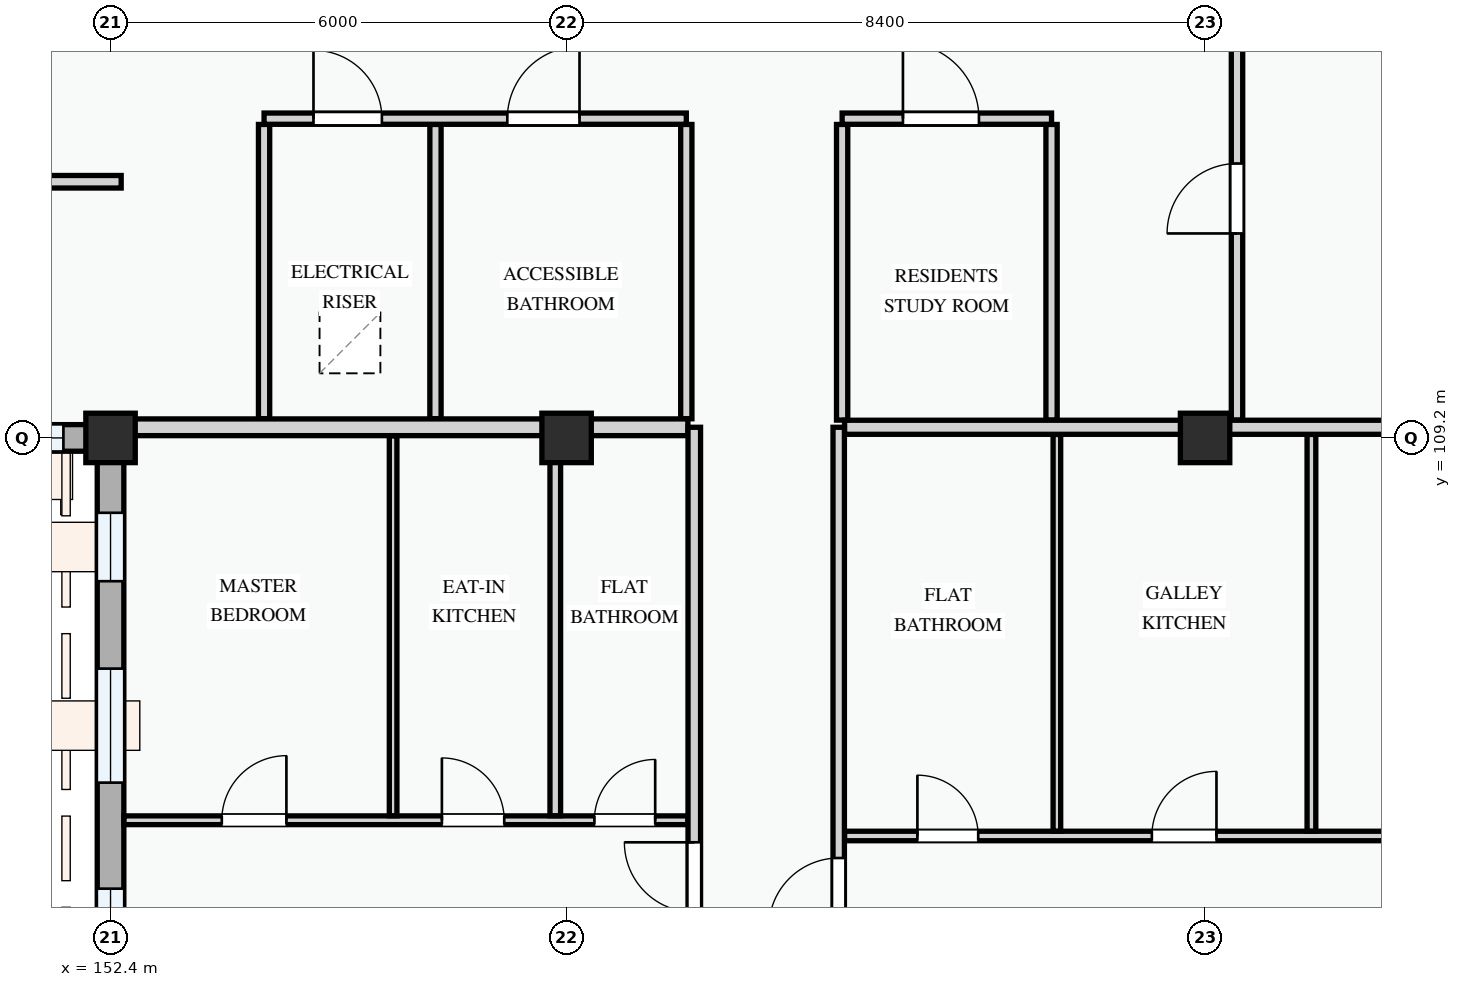
"""IFC4 building model, lengths in metres.
Left out: names, types, materials, properties, quantities, classifications, styles, units other than length and angle.
Written with IfcOpenShell. Run it as: python <this file> out.ifc"""

import sys

from ifc_helpers import new_model, si_unit, direction, frame, frame_2d, origin, origin_2d, place, context, subcontext, project, spatial, rectangle, extrude, element, fill, save


model = new_model("IFC4")
c1 = context("Model", 3, precision=1e-05, world=origin(), true_north=direction((0.0, 1.0)))
c2 = subcontext(c1, "Body", "Model", "MODEL_VIEW")
j1 = project(units=[si_unit("LENGTHUNIT", "METRE"), si_unit("PLANEANGLEUNIT", "RADIAN")], contexts=[c1])
p1 = place(None, origin())
s1 = spatial("IfcSite", under=j1, at=p1, CompositionType="ELEMENT")
p2 = place(p1, origin())
s2 = spatial("IfcBuilding", under=s1, at=p2, CompositionType="ELEMENT")
p3 = place(p2, frame((0.0, 0.0, 11.4)))
s3 = spatial("IfcBuildingStorey", under=s2, at=p3, CompositionType="ELEMENT", Elevation=11.4)
for number, where, z_axis, x_axis in (
    (1, (152.4, 109.2, 0.0), (0.0, 0.0, 1.0), (1.0, 0.0, 0.0)),
    (2, (158.4, 109.2, 0.0), (0.0, 0.0, 1.0), (1.0, 0.0, 0.0)),
    (3, (166.8, 109.2, 0.0), (0.0, 0.0, 1.0), (1.0, 0.0, 0.0)),
):
    element("IfcColumn", number, at=place(p3, frame(where, z_axis=z_axis, x_axis=x_axis)), inside=s3, PredefinedType="COLUMN", context=c2, shape_type="SweptSolid", body=[
        extrude(rectangle(XDim=0.65, YDim=0.65, at=origin_2d()), origin(), (0.0, 0.0, 1.0), 3.3),
    ])
p4 = place(p3, frame((144.0, 109.2, 0.0), z_axis=(0.0, 0.0, 1.0), x_axis=(1.0, 0.0, 0.0)))
e4 = element("IfcWall", 4, at=p4, inside=s3, PredefinedType="STANDARD", context=c2, shape_type="SweptSolid", body=[
    extrude(rectangle(XDim=8.4, YDim=0.35, at=frame_2d((4.2, 0.0))), origin(), (0.0, 0.0, 1.0), 2.375),
])
p5 = place(p4, frame((0.99, 0.0, 0.78)))
e5 = element("IfcOpeningElement", 5, at=p5, cuts=e4, PredefinedType="OPENING", context=c2, shape_type="SweptSolid", body=[
    extrude(rectangle(XDim=1.4, YDim=1.45, at=frame_2d((0.7, 0.725))), frame((0.0, 0.185, 0.0), z_axis=(0.0, -1.0, 0.0), x_axis=(1.0, 0.0, 0.0)), (0.0, 0.0, 1.0), 0.37),
])
p6 = place(p4, frame((3.925, 0.0, 0.78)))
e6 = element("IfcOpeningElement", 6, at=p6, cuts=e4, PredefinedType="OPENING", context=c2, shape_type="SweptSolid", body=[
    extrude(rectangle(XDim=1.25, YDim=1.45, at=frame_2d((0.625, 0.725))), frame((0.0, 0.185, 0.0), z_axis=(0.0, -1.0, 0.0), x_axis=(1.0, 0.0, 0.0)), (0.0, 0.0, 1.0), 0.37),
])
p7 = place(p4, frame((6.48, 0.0, 0.78)))
e7 = element("IfcOpeningElement", 7, at=p7, cuts=e4, PredefinedType="OPENING", context=c2, shape_type="SweptSolid", body=[
    extrude(rectangle(XDim=1.3, YDim=1.4, at=frame_2d((0.65, 0.7))), frame((0.0, 0.185, 0.0), z_axis=(0.0, -1.0, 0.0), x_axis=(1.0, 0.0, 0.0)), (0.0, 0.0, 1.0), 0.37),
])
p8 = place(p3, frame((152.4, 109.2, 0.0), z_axis=(0.0, 0.0, 1.0), x_axis=(0.0, -1.0, 0.0)))
e8 = element("IfcWall", 8, at=p8, inside=s3, PredefinedType="STANDARD", context=c2, shape_type="SweptSolid", body=[
    extrude(rectangle(XDim=8.4, YDim=0.35, at=frame_2d((4.2, 0.0))), origin(), (0.0, 0.0, 1.0), 2.425),
])
p9 = place(p8, frame((0.985, 0.0, 0.78)))
e9 = element("IfcOpeningElement", 9, at=p9, cuts=e8, PredefinedType="OPENING", context=c2, shape_type="SweptSolid", body=[
    extrude(rectangle(XDim=0.9, YDim=1.2, at=frame_2d((0.45, 0.6))), frame((0.0, 0.185, 0.0), z_axis=(0.0, -1.0, 0.0), x_axis=(1.0, 0.0, 0.0)), (0.0, 0.0, 1.0), 0.37),
])
p10 = place(p8, frame((3.035, 0.0, 0.78)))
e10 = element("IfcOpeningElement", 10, at=p10, cuts=e8, PredefinedType="OPENING", context=c2, shape_type="SweptSolid", body=[
    extrude(rectangle(XDim=1.5, YDim=1.5, at=frame_2d((0.75, 0.75))), frame((0.0, 0.185, 0.0), z_axis=(0.0, -1.0, 0.0), x_axis=(1.0, 0.0, 0.0)), (0.0, 0.0, 1.0), 0.37),
])
p11 = place(p8, frame((5.93, 0.0, 0.78)))
e11 = element("IfcOpeningElement", 11, at=p11, cuts=e8, PredefinedType="OPENING", context=c2, shape_type="SweptSolid", body=[
    extrude(rectangle(XDim=1.38, YDim=1.48, at=frame_2d((0.69, 0.74))), frame((0.0, 0.185, 0.0), z_axis=(0.0, -1.0, 0.0), x_axis=(1.0, 0.0, 0.0)), (0.0, 0.0, 1.0), 0.37),
])
for number, where, z_axis, x_axis in (
    (12, (154.42, 113.324, 0.0), (0.0, 0.0, 1.0), (0.0, -1.0, 0.0)),
    (13, (156.675, 113.324, 0.0), (0.0, 0.0, 1.0), (0.0, -1.0, 0.0)),
    (14, (159.975, 113.324, 0.0), (0.0, 0.0, 1.0), (0.0, -1.0, 0.0)),
):
    element("IfcWall", number, at=place(p3, frame(where, z_axis=z_axis, x_axis=x_axis)), inside=s3, PredefinedType="PARTITIONING", context=c2, shape_type="SweptSolid", body=[
        extrude(rectangle(XDim=3.872, YDim=0.148, at=frame_2d((1.936, 0.0))), origin(), (0.0, 0.0, 1.0), 3.0),
    ])
for number, where, z_axis, x_axis in (
    (15, (162.025, 113.324, 0.0), (0.0, 0.0, 1.0), (0.0, -1.0, 0.0)),
    (16, (164.78, 113.324, 0.0), (0.0, 0.0, 1.0), (0.0, -1.0, 0.0)),
):
    element("IfcWall", number, at=place(p3, frame(where, z_axis=z_axis, x_axis=x_axis)), inside=s3, PredefinedType="PARTITIONING", context=c2, shape_type="SweptSolid", body=[
        extrude(rectangle(XDim=3.889, YDim=0.148, at=frame_2d((1.945, 0.0))), origin(), (0.0, 0.0, 1.0), 3.0),
    ])
p12 = place(p3, frame((154.42, 113.4, 0.0), z_axis=(0.0, 0.0, 1.0), x_axis=(1.0, 0.0, 0.0)))
e17 = element("IfcWall", 17, at=p12, inside=s3, PredefinedType="PARTITIONING", context=c2, shape_type="SweptSolid", body=[
    extrude(rectangle(XDim=5.555, YDim=0.148, at=frame_2d((2.778, 0.0))), origin(), (0.0, 0.0, 1.0), 3.0),
])
p13 = place(p12, frame((0.65, 0.0, 0.0)))
e18 = element("IfcOpeningElement", 18, at=p13, cuts=e17, PredefinedType="OPENING", context=c2, shape_type="SweptSolid", body=[
    extrude(rectangle(XDim=0.9, YDim=2.1, at=frame_2d((0.45, 1.05))), frame((0.0, 0.084, 0.0), z_axis=(0.0, -1.0, 0.0), x_axis=(1.0, 0.0, 0.0)), (0.0, 0.0, 1.0), 0.168),
])
p14 = place(p12, frame((3.2, 0.0, 0.0)))
e19 = element("IfcOpeningElement", 19, at=p14, cuts=e17, PredefinedType="OPENING", context=c2, shape_type="SweptSolid", body=[
    extrude(rectangle(XDim=0.95, YDim=2.1, at=frame_2d((0.475, 1.05))), frame((0.0, 0.084, 0.0), z_axis=(0.0, -1.0, 0.0), x_axis=(1.0, 0.0, 0.0)), (0.0, 0.0, 1.0), 0.168),
])
p15 = place(p3, frame((162.025, 113.4, 0.0), z_axis=(0.0, 0.0, 1.0), x_axis=(1.0, 0.0, 0.0)))
e20 = element("IfcWall", 20, at=p15, inside=s3, PredefinedType="PARTITIONING", context=c2, shape_type="SweptSolid", body=[
    extrude(rectangle(XDim=2.755, YDim=0.148, at=frame_2d((1.377, 0.0))), origin(), (0.0, 0.0, 1.0), 3.0),
])
p16 = place(p15, frame((0.8, 0.0, 0.0)))
e21 = element("IfcOpeningElement", 21, at=p16, cuts=e20, PredefinedType="OPENING", context=c2, shape_type="SweptSolid", body=[
    extrude(rectangle(XDim=1.0, YDim=2.15, at=frame_2d((0.5, 1.075))), frame((0.0, 0.084, 0.0), z_axis=(0.0, -1.0, 0.0), x_axis=(1.0, 0.0, 0.0)), (0.0, 0.0, 1.0), 0.168),
])
p17 = place(p3, frame((150.127, 112.57, 0.0), z_axis=(0.0, 0.0, 1.0), x_axis=(1.0, 0.0, 0.0)))
e22 = element("IfcWall", 22, at=p17, inside=s3, PredefinedType="PARTITIONING", context=c2, shape_type="SweptSolid", body=[
    extrude(rectangle(XDim=2.413, YDim=0.165, at=frame_2d((1.207, 0.0))), origin(), (0.0, 0.0, 1.0), 3.0),
])
p18 = place(p3, frame((167.22, 109.435, 0.0), z_axis=(0.0, 0.0, 1.0), x_axis=(0.0, 1.0, 0.0)))
e23 = element("IfcWall", 23, at=p18, inside=s3, PredefinedType="PARTITIONING", context=c2, shape_type="SweptSolid", body=[
    extrude(rectangle(XDim=13.989, YDim=0.15, at=frame_2d((6.994, 0.0))), origin(), (0.0, 0.0, 1.0), 2.425),
])
p19 = place(p18, frame((2.456, 0.0, 0.0)))
e24 = element("IfcOpeningElement", 24, at=p19, cuts=e23, PredefinedType="OPENING", context=c2, shape_type="SweptSolid", body=[
    extrude(rectangle(XDim=0.92, YDim=2.1, at=frame_2d((0.46, 1.05))), frame((0.0, 0.085, 0.0), z_axis=(0.0, -1.0, 0.0), x_axis=(1.0, 0.0, 0.0)), (0.0, 0.0, 1.0), 0.17),
])
p20 = place(p3, frame((152.577, 104.17, 0.0), z_axis=(0.0, 0.0, 1.0), x_axis=(1.0, 0.0, 0.0)))
e25 = element("IfcWall", 25, at=p20, inside=s3, PredefinedType="PARTITIONING", context=c2, shape_type="SweptSolid", body=[
    extrude(rectangle(XDim=7.419, YDim=0.115, at=frame_2d((3.709, 0.0))), origin(), (0.0, 0.0, 1.0), 3.0),
])
p21 = place(p20, frame((1.287, 0.0, 0.0)))
e26 = element("IfcOpeningElement", 26, at=p21, cuts=e25, PredefinedType="OPENING", context=c2, shape_type="SweptSolid", body=[
    extrude(rectangle(XDim=0.85, YDim=2.1, at=frame_2d((0.425, 1.05))), frame((0.0, 0.067, 0.0), z_axis=(0.0, -1.0, 0.0), x_axis=(1.0, 0.0, 0.0)), (0.0, 0.0, 1.0), 0.135),
])
p22 = place(p20, frame((4.182, 0.0, 0.0)))
e27 = element("IfcOpeningElement", 27, at=p22, cuts=e25, PredefinedType="OPENING", context=c2, shape_type="SweptSolid", body=[
    extrude(rectangle(XDim=0.82, YDim=2.08, at=frame_2d((0.41, 1.04))), frame((0.0, 0.067, 0.0), z_axis=(0.0, -1.0, 0.0), x_axis=(1.0, 0.0, 0.0)), (0.0, 0.0, 1.0), 0.135),
])
p23 = place(p20, frame((6.189, 0.0, 0.0)))
e28 = element("IfcOpeningElement", 28, at=p23, cuts=e25, PredefinedType="OPENING", context=c2, shape_type="SweptSolid", body=[
    extrude(rectangle(XDim=0.8, YDim=2.1, at=frame_2d((0.4, 1.05))), frame((0.0, 0.067, 0.0), z_axis=(0.0, -1.0, 0.0), x_axis=(1.0, 0.0, 0.0)), (0.0, 0.0, 1.0), 0.135),
])
p24 = place(p3, frame((156.118, 104.229, 0.0), z_axis=(0.0, 0.0, 1.0), x_axis=(0.0, 1.0, 0.0)))
e29 = element("IfcWall", 29, at=p24, inside=s3, PredefinedType="PARTITIONING", context=c2, shape_type="SweptSolid", body=[
    extrude(rectangle(XDim=4.999, YDim=0.1, at=frame_2d((2.499, 0.0))), origin(), (0.0, 0.0, 1.0), 3.0),
])
p25 = place(p3, frame((158.251, 104.229, 0.0), z_axis=(0.0, 0.0, 1.0), x_axis=(0.0, 1.0, 0.0)))
e30 = element("IfcWall", 30, at=p25, inside=s3, PredefinedType="PARTITIONING", context=c2, shape_type="SweptSolid", body=[
    extrude(rectangle(XDim=4.999, YDim=0.14, at=frame_2d((2.499, 0.0))), origin(), (0.0, 0.0, 1.0), 2.425),
])
p26 = place(p3, frame((162.057, 103.963, 0.0), z_axis=(0.0, 0.0, 1.0), x_axis=(1.0, 0.0, 0.0)))
e31 = element("IfcWall", 31, at=p26, inside=s3, PredefinedType="PARTITIONING", context=c2, shape_type="SweptSolid", body=[
    extrude(rectangle(XDim=11.766, YDim=0.125, at=frame_2d((5.883, 0.0))), origin(), (0.0, 0.0, 1.0), 3.0),
])
p27 = place(p26, frame((0.958, 0.0, 0.0)))
e32 = element("IfcOpeningElement", 32, at=p27, cuts=e31, PredefinedType="OPENING", context=c2, shape_type="SweptSolid", body=[
    extrude(rectangle(XDim=0.8, YDim=2.1, at=frame_2d((0.4, 1.05))), frame((0.0, 0.073, 0.0), z_axis=(0.0, -1.0, 0.0), x_axis=(1.0, 0.0, 0.0)), (0.0, 0.0, 1.0), 0.145),
])
p28 = place(p26, frame((4.043, 0.0, 0.0)))
e33 = element("IfcOpeningElement", 33, at=p28, cuts=e31, PredefinedType="OPENING", context=c2, shape_type="SweptSolid", body=[
    extrude(rectangle(XDim=0.85, YDim=2.1, at=frame_2d((0.425, 1.05))), frame((0.0, 0.073, 0.0), z_axis=(0.0, -1.0, 0.0), x_axis=(1.0, 0.0, 0.0)), (0.0, 0.0, 1.0), 0.145),
])
p29 = place(p26, frame((8.588, 0.0, 0.0)))
e34 = element("IfcOpeningElement", 34, at=p29, cuts=e31, PredefinedType="OPENING", context=c2, shape_type="SweptSolid", body=[
    extrude(rectangle(XDim=0.82, YDim=2.08, at=frame_2d((0.41, 1.04))), frame((0.0, 0.073, 0.0), z_axis=(0.0, -1.0, 0.0), x_axis=(1.0, 0.0, 0.0)), (0.0, 0.0, 1.0), 0.145),
])
p30 = place(p3, frame((168.199, 104.028, 0.0), z_axis=(0.0, 0.0, 1.0), x_axis=(0.0, 1.0, 0.0)))
e35 = element("IfcWall", 35, at=p30, inside=s3, PredefinedType="PARTITIONING", context=c2, shape_type="SweptSolid", body=[
    extrude(rectangle(XDim=5.218, YDim=0.115, at=frame_2d((2.609, 0.0))), origin(), (0.0, 0.0, 1.0), 3.0),
])
p31 = place(p3, frame((164.85, 104.028, 0.0), z_axis=(0.0, 0.0, 1.0), x_axis=(0.0, 1.0, 0.0)))
e36 = element("IfcWall", 36, at=p31, inside=s3, PredefinedType="PARTITIONING", context=c2, shape_type="SweptSolid", body=[
    extrude(rectangle(XDim=5.218, YDim=0.1, at=frame_2d((2.609, 0.0))), origin(), (0.0, 0.0, 1.0), 3.0),
])
p32 = place(p3, frame((152.46, 109.34, 0.0), z_axis=(0.0, 0.0, 1.0), x_axis=(1.0, 0.0, 0.0)))
e37 = element("IfcWall", 37, at=p32, inside=s3, PredefinedType="PARTITIONING", context=c2, shape_type="SweptSolid", body=[
    extrude(rectangle(XDim=7.536, YDim=0.22, at=frame_2d((3.768, 0.0))), origin(), (0.0, 0.0, 1.0), 2.375),
])
p33 = place(p3, frame((162.057, 109.34, 0.0), z_axis=(0.0, 0.0, 1.0), x_axis=(1.0, 0.0, 0.0)))
e38 = element("IfcWall", 38, at=p33, inside=s3, PredefinedType="PARTITIONING", context=c2, shape_type="SweptSolid", body=[
    extrude(rectangle(XDim=11.766, YDim=0.185, at=frame_2d((5.883, 0.0))), origin(), (0.0, 0.0, 1.0), 2.375),
])
p34 = place(p3, frame((160.08, 80.46, 0.0), z_axis=(0.0, 0.0, 1.0), x_axis=(0.0, 1.0, 0.0)))
e39 = element("IfcWall", 39, at=p34, inside=s3, PredefinedType="PARTITIONING", context=c2, shape_type="SweptSolid", body=[
    extrude(rectangle(XDim=28.88, YDim=0.165, at=frame_2d((14.44, 0.0))), origin(), (0.0, 0.0, 1.0), 3.0),
])
p35 = place(p34, frame((2.484, 0.0, 0.0)))
e40 = element("IfcOpeningElement", 40, at=p35, cuts=e39, PredefinedType="OPENING", context=c2, shape_type="SweptSolid", body=[
    extrude(rectangle(XDim=0.92, YDim=2.1, at=frame_2d((0.46, 1.05))), frame((0.0, 0.093, 0.0), z_axis=(0.0, -1.0, 0.0), x_axis=(1.0, 0.0, 0.0)), (0.0, 0.0, 1.0), 0.185),
])
p36 = place(p34, frame((10.07, 0.0, 0.0)))
e41 = element("IfcOpeningElement", 41, at=p36, cuts=e39, PredefinedType="OPENING", context=c2, shape_type="SweptSolid", body=[
    extrude(rectangle(XDim=0.92, YDim=2.1, at=frame_2d((0.46, 1.05))), frame((0.0, 0.093, 0.0), z_axis=(0.0, -1.0, 0.0), x_axis=(1.0, 0.0, 0.0)), (0.0, 0.0, 1.0), 0.185),
])
p37 = place(p34, frame((22.5, 0.0, 0.0)))
e42 = element("IfcOpeningElement", 42, at=p37, cuts=e39, PredefinedType="OPENING", context=c2, shape_type="SweptSolid", body=[
    extrude(rectangle(XDim=0.92, YDim=2.1, at=frame_2d((0.46, 1.05))), frame((0.0, 0.093, 0.0), z_axis=(0.0, -1.0, 0.0), x_axis=(1.0, 0.0, 0.0)), (0.0, 0.0, 1.0), 0.185),
])
p38 = place(p3, frame((161.98, 80.46, 0.0), z_axis=(0.0, 0.0, 1.0), x_axis=(0.0, 1.0, 0.0)))
e43 = element("IfcWall", 43, at=p38, inside=s3, PredefinedType="PARTITIONING", context=c2, shape_type="SweptSolid", body=[
    extrude(rectangle(XDim=28.88, YDim=0.15, at=frame_2d((14.44, 0.0))), origin(), (0.0, 0.0, 1.0), 3.0),
])
p39 = place(p38, frame((2.487, 0.0, 0.0)))
e44 = element("IfcOpeningElement", 44, at=p39, cuts=e43, PredefinedType="OPENING", context=c2, shape_type="SweptSolid", body=[
    extrude(rectangle(XDim=0.96, YDim=2.12, at=frame_2d((0.48, 1.06))), frame((0.0, 0.085, 0.0), z_axis=(0.0, -1.0, 0.0), x_axis=(1.0, 0.0, 0.0)), (0.0, 0.0, 1.0), 0.17),
])
p40 = place(p38, frame((10.07, 0.0, 0.0)))
e45 = element("IfcOpeningElement", 45, at=p40, cuts=e43, PredefinedType="OPENING", context=c2, shape_type="SweptSolid", body=[
    extrude(rectangle(XDim=0.92, YDim=2.1, at=frame_2d((0.46, 1.05))), frame((0.0, 0.085, 0.0), z_axis=(0.0, -1.0, 0.0), x_axis=(1.0, 0.0, 0.0)), (0.0, 0.0, 1.0), 0.17),
])
p41 = place(p38, frame((22.293, 0.0, 0.0)))
e46 = element("IfcOpeningElement", 46, at=p41, cuts=e43, PredefinedType="OPENING", context=c2, shape_type="SweptSolid", body=[
    extrude(rectangle(XDim=0.92, YDim=2.1, at=frame_2d((0.46, 1.05))), frame((0.0, 0.085, 0.0), z_axis=(0.0, -1.0, 0.0), x_axis=(1.0, 0.0, 0.0)), (0.0, 0.0, 1.0), 0.17),
])
p42 = place(p7, origin())
e47 = element("IfcWindow", 47, at=p42, inside=s3, PartitioningType="SINGLE_PANEL", PredefinedType="WINDOW", context=c2, shape_type="SweptSolid", body=[
    extrude(rectangle(XDim=1.3, YDim=1.4, at=frame_2d((0.65, 0.7))), frame((0.0, 0.03, 0.0), z_axis=(0.0, -1.0, 0.0), x_axis=(1.0, 0.0, 0.0)), (0.0, 0.0, 1.0), 0.06),
])
fill(e7, e47)
p43 = place(p9, origin())
e48 = element("IfcWindow", 48, at=p43, inside=s3, PartitioningType="SINGLE_PANEL", PredefinedType="WINDOW", context=c2, shape_type="SweptSolid", body=[
    extrude(rectangle(XDim=0.9, YDim=1.2, at=frame_2d((0.45, 0.6))), frame((0.0, 0.03, 0.0), z_axis=(0.0, -1.0, 0.0), x_axis=(1.0, 0.0, 0.0)), (0.0, 0.0, 1.0), 0.06),
])
fill(e9, e48)
p44 = place(p10, origin())
e49 = element("IfcWindow", 49, at=p44, inside=s3, PartitioningType="SINGLE_PANEL", PredefinedType="WINDOW", context=c2, shape_type="SweptSolid", body=[
    extrude(rectangle(XDim=1.5, YDim=1.5, at=frame_2d((0.75, 0.75))), frame((0.0, 0.03, 0.0), z_axis=(0.0, -1.0, 0.0), x_axis=(1.0, 0.0, 0.0)), (0.0, 0.0, 1.0), 0.06),
])
fill(e10, e49)
p45 = place(p11, origin())
e50 = element("IfcWindow", 50, at=p45, inside=s3, PartitioningType="SINGLE_PANEL", PredefinedType="WINDOW", context=c2, shape_type="SweptSolid", body=[
    extrude(rectangle(XDim=1.38, YDim=1.48, at=frame_2d((0.69, 0.74))), frame((0.0, 0.03, 0.0), z_axis=(0.0, -1.0, 0.0), x_axis=(1.0, 0.0, 0.0)), (0.0, 0.0, 1.0), 0.06),
])
fill(e11, e50)
p46 = place(p13, origin())
e51 = element("IfcDoor", 51, at=p46, inside=s3, OperationType="SINGLE_SWING_LEFT", PredefinedType="DOOR", context=c2, shape_type="SweptSolid", body=[
    extrude(rectangle(XDim=0.9, YDim=2.1, at=frame_2d((0.45, 1.05))), frame((0.0, 0.025, 0.0), z_axis=(0.0, -1.0, 0.0), x_axis=(1.0, 0.0, 0.0)), (0.0, 0.0, 1.0), 0.05),
])
fill(e18, e51)
p47 = place(p14, origin())
e52 = element("IfcDoor", 52, at=p47, inside=s3, OperationType="SINGLE_SWING_RIGHT", PredefinedType="DOOR", context=c2, shape_type="SweptSolid", body=[
    extrude(rectangle(XDim=0.95, YDim=2.1, at=frame_2d((0.475, 1.05))), frame((0.0, 0.025, 0.0), z_axis=(0.0, -1.0, 0.0), x_axis=(1.0, 0.0, 0.0)), (0.0, 0.0, 1.0), 0.05),
])
fill(e19, e52)
p48 = place(p16, origin())
e53 = element("IfcDoor", 53, at=p48, inside=s3, OperationType="SINGLE_SWING_LEFT", PredefinedType="DOOR", context=c2, shape_type="SweptSolid", body=[
    extrude(rectangle(XDim=1.0, YDim=2.15, at=frame_2d((0.5, 1.075))), frame((0.0, 0.025, 0.0), z_axis=(0.0, -1.0, 0.0), x_axis=(1.0, 0.0, 0.0)), (0.0, 0.0, 1.0), 0.05),
])
fill(e21, e53)
p49 = place(p19, origin())
e54 = element("IfcDoor", 54, at=p49, inside=s3, OperationType="SINGLE_SWING_LEFT", PredefinedType="DOOR", context=c2, shape_type="SweptSolid", body=[
    extrude(rectangle(XDim=0.92, YDim=2.1, at=frame_2d((0.46, 1.05))), frame((0.0, 0.025, 0.0), z_axis=(0.0, -1.0, 0.0), x_axis=(1.0, 0.0, 0.0)), (0.0, 0.0, 1.0), 0.05),
])
fill(e24, e54)
p50 = place(p21, origin())
e55 = element("IfcDoor", 55, at=p50, inside=s3, OperationType="SINGLE_SWING_RIGHT", PredefinedType="DOOR", context=c2, shape_type="SweptSolid", body=[
    extrude(rectangle(XDim=0.85, YDim=2.1, at=frame_2d((0.425, 1.05))), frame((0.0, 0.025, 0.0), z_axis=(0.0, -1.0, 0.0), x_axis=(1.0, 0.0, 0.0)), (0.0, 0.0, 1.0), 0.05),
])
fill(e26, e55)
p51 = place(p22, origin())
e56 = element("IfcDoor", 56, at=p51, inside=s3, OperationType="SINGLE_SWING_LEFT", PredefinedType="DOOR", context=c2, shape_type="SweptSolid", body=[
    extrude(rectangle(XDim=0.82, YDim=2.08, at=frame_2d((0.41, 1.04))), frame((0.0, 0.025, 0.0), z_axis=(0.0, -1.0, 0.0), x_axis=(1.0, 0.0, 0.0)), (0.0, 0.0, 1.0), 0.05),
])
fill(e27, e56)
p52 = place(p23, origin())
e57 = element("IfcDoor", 57, at=p52, inside=s3, OperationType="SINGLE_SWING_RIGHT", PredefinedType="DOOR", context=c2, shape_type="SweptSolid", body=[
    extrude(rectangle(XDim=0.8, YDim=2.1, at=frame_2d((0.4, 1.05))), frame((0.0, 0.025, 0.0), z_axis=(0.0, -1.0, 0.0), x_axis=(1.0, 0.0, 0.0)), (0.0, 0.0, 1.0), 0.05),
])
fill(e28, e57)
p53 = place(p27, origin())
e58 = element("IfcDoor", 58, at=p53, inside=s3, OperationType="SINGLE_SWING_LEFT", PredefinedType="DOOR", context=c2, shape_type="SweptSolid", body=[
    extrude(rectangle(XDim=0.8, YDim=2.1, at=frame_2d((0.4, 1.05))), frame((0.0, 0.025, 0.0), z_axis=(0.0, -1.0, 0.0), x_axis=(1.0, 0.0, 0.0)), (0.0, 0.0, 1.0), 0.05),
])
fill(e32, e58)
p54 = place(p28, origin())
e59 = element("IfcDoor", 59, at=p54, inside=s3, OperationType="SINGLE_SWING_RIGHT", PredefinedType="DOOR", context=c2, shape_type="SweptSolid", body=[
    extrude(rectangle(XDim=0.85, YDim=2.1, at=frame_2d((0.425, 1.05))), frame((0.0, 0.025, 0.0), z_axis=(0.0, -1.0, 0.0), x_axis=(1.0, 0.0, 0.0)), (0.0, 0.0, 1.0), 0.05),
])
fill(e33, e59)
p55 = place(p37, origin())
e60 = element("IfcDoor", 60, at=p55, inside=s3, OperationType="SINGLE_SWING_RIGHT", PredefinedType="DOOR", context=c2, shape_type="SweptSolid", body=[
    extrude(rectangle(XDim=0.92, YDim=2.1, at=frame_2d((0.46, 1.05))), frame((0.0, 0.025, 0.0), z_axis=(0.0, -1.0, 0.0), x_axis=(1.0, 0.0, 0.0)), (0.0, 0.0, 1.0), 0.05),
])
fill(e42, e60)
p56 = place(p41, origin())
e61 = element("IfcDoor", 61, at=p56, inside=s3, OperationType="SINGLE_SWING_LEFT", PredefinedType="DOOR", context=c2, shape_type="SweptSolid", body=[
    extrude(rectangle(XDim=0.92, YDim=2.1, at=frame_2d((0.46, 1.05))), frame((0.0, 0.025, 0.0), z_axis=(0.0, -1.0, 0.0), x_axis=(1.0, 0.0, 0.0)), (0.0, 0.0, 1.0), 0.05),
])
fill(e46, e61)
save(model, sys.argv[1])
